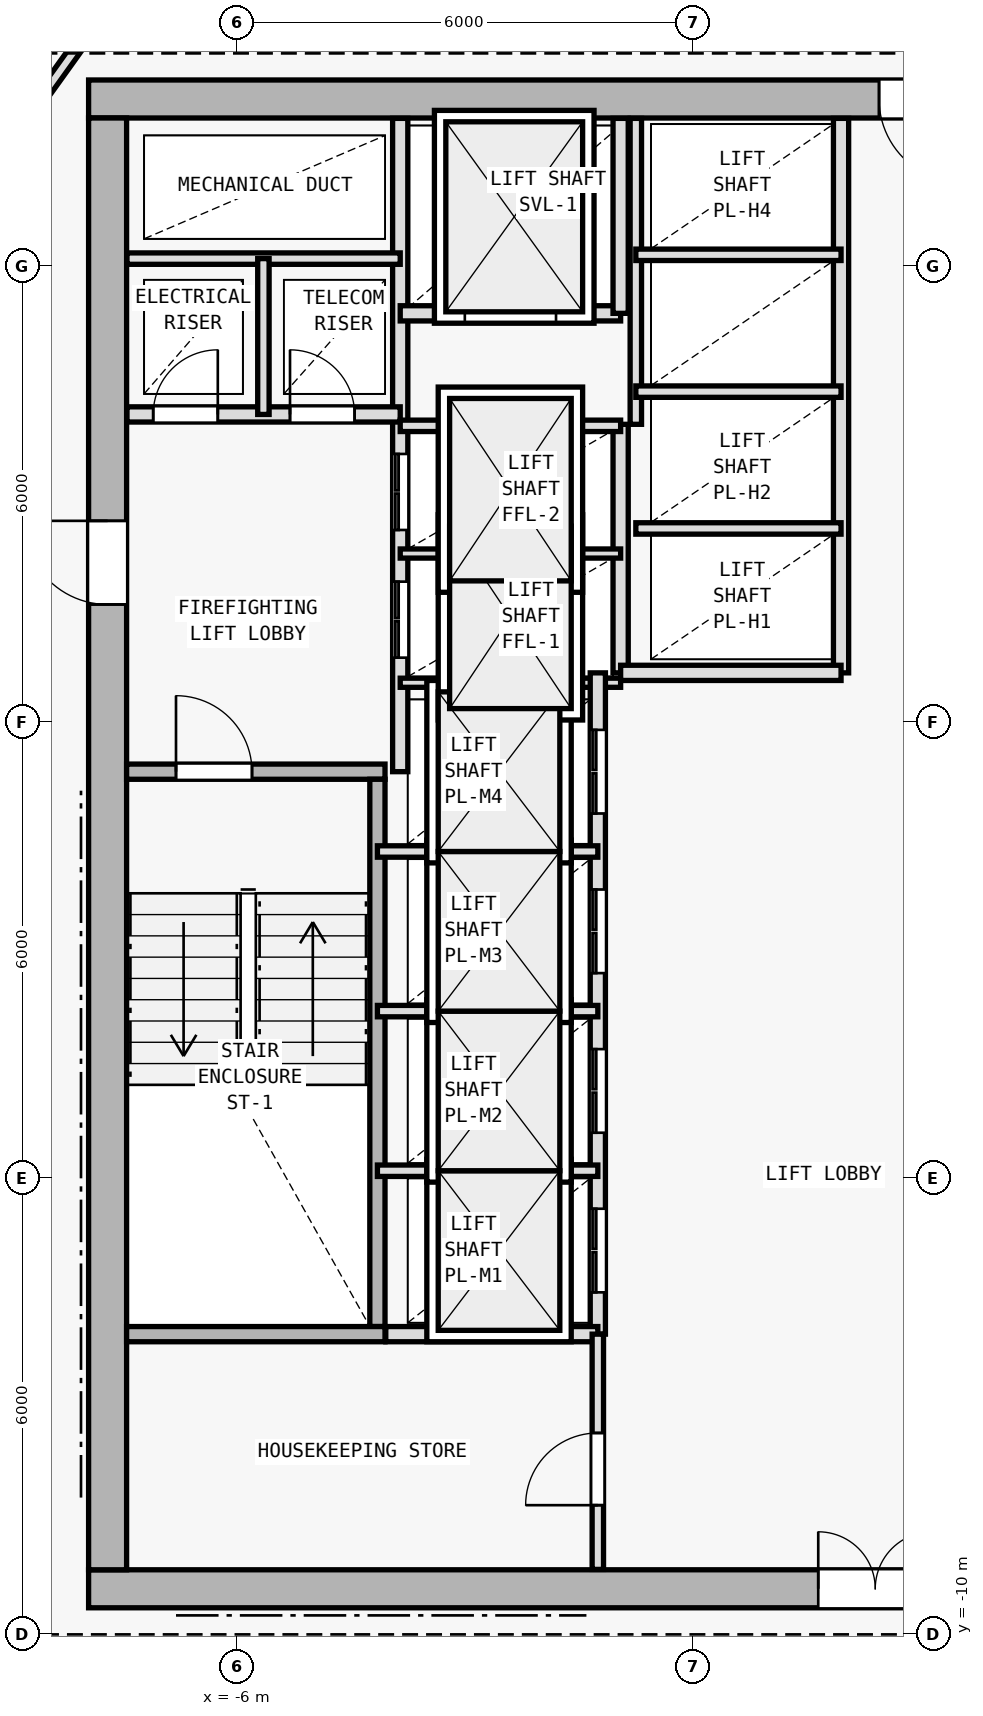
"""IFC4 building model, lengths in metres.
Left out: names, types, materials, properties, quantities, classifications, styles, units other than length and angle.
Written with IfcOpenShell. Run it as: python <this file> out.ifc"""

import sys

from ifc_helpers import new_model, si_unit, direction, frame, frame_2d, origin, origin_2d, place, context, subcontext, project, spatial, rectangle, i_section, extrude, element, fill, save


model = new_model("IFC4")
c1 = context("Model", 3, precision=1e-05, world=origin(), true_north=direction((0.0, 1.0)))
c2 = subcontext(c1, "Body", "Model", "MODEL_VIEW")
j1 = project(units=[si_unit("LENGTHUNIT", "METRE"), si_unit("PLANEANGLEUNIT", "RADIAN")], contexts=[c1])
p1 = place(None, origin())
s1 = spatial("IfcSite", under=j1, at=p1, CompositionType="ELEMENT")
p2 = place(p1, origin())
s2 = spatial("IfcBuilding", under=s1, at=p2, CompositionType="ELEMENT")
p3 = place(p2, frame((0.0, 0.0, 138.6)))
s3 = spatial("IfcBuildingStorey", under=s2, at=p3, CompositionType="ELEMENT", Elevation=138.6)
for number, where, z_axis, x_axis in (
    (1, (-7.7, -9.4, 0.0), (0.0, 0.0, 1.0), (1.0, 0.0, 0.0)),
    (2, (-7.7, 10.2, 0.0), (0.0, 0.0, 1.0), (1.0, 0.0, 0.0)),
    (3, (0.0, -9.4, 0.0), (0.0, 0.0, 1.0), (1.0, 0.0, 0.0)),
    (4, (-7.7, 2.0, 0.0), (0.0, 0.0, 1.0), (1.0, 0.0, 0.0)),
):
    element("IfcColumn", number, at=place(p3, frame(where, z_axis=z_axis, x_axis=x_axis)), inside=s3, PredefinedType="COLUMN", context=c2, shape_type="SweptSolid", body=[
        extrude(i_section(OverallWidth=0.404, OverallDepth=0.407, WebThickness=0.017, FlangeThickness=0.028, FilletRadius=0.015, at=origin_2d()), origin(), (0.0, 0.0, 1.0), 3.6),
    ])
p4 = place(p3, frame((-7.95, -9.4, 0.0), z_axis=(0.0, 0.0, 1.0), x_axis=(1.0, 0.0, 0.0)))
e5 = element("IfcWall", 5, at=p4, inside=s3, PredefinedType="SHEAR", context=c2, shape_type="SweptSolid", body=[
    extrude(rectangle(XDim=15.9, YDim=0.5, at=frame_2d((7.95, 0.0))), origin(), (0.0, 0.0, 1.0), 3.35),
])
p5 = place(p4, frame((9.6, 0.0, 0.0)))
e6 = element("IfcOpeningElement", 6, at=p5, cuts=e5, PredefinedType="OPENING", context=c2, shape_type="SweptSolid", body=[
    extrude(rectangle(XDim=1.5, YDim=2.2, at=frame_2d((0.75, 1.1))), frame((0.0, 0.26, 0.0), z_axis=(0.0, -1.0, 0.0), x_axis=(1.0, 0.0, 0.0)), (0.0, 0.0, 1.0), 0.52),
])
p6 = place(p3, frame((7.95, 10.2, 0.0), z_axis=(0.0, 0.0, 1.0), x_axis=(-1.0, 0.0, 0.0)))
e7 = element("IfcWall", 7, at=p6, inside=s3, PredefinedType="SHEAR", context=c2, shape_type="SweptSolid", body=[
    extrude(rectangle(XDim=15.9, YDim=0.5, at=frame_2d((7.95, 0.0))), origin(), (0.0, 0.0, 1.0), 3.35),
])
p7 = place(p6, frame((4.4, 0.0, 0.0)))
e8 = element("IfcOpeningElement", 8, at=p7, cuts=e7, PredefinedType="OPENING", context=c2, shape_type="SweptSolid", body=[
    extrude(rectangle(XDim=1.1, YDim=2.15, at=frame_2d((0.55, 1.075))), frame((0.0, 0.26, 0.0), z_axis=(0.0, -1.0, 0.0), x_axis=(1.0, 0.0, 0.0)), (0.0, 0.0, 1.0), 0.52),
])
p8 = place(p3, frame((-7.7, -9.15, 0.0), z_axis=(0.0, 0.0, 1.0), x_axis=(0.0, 1.0, 0.0)))
e9 = element("IfcWall", 9, at=p8, inside=s3, PredefinedType="SHEAR", context=c2, shape_type="SweptSolid", body=[
    extrude(rectangle(XDim=19.1, YDim=0.5, at=frame_2d((9.55, 0.0))), origin(), (0.0, 0.0, 1.0), 3.35),
])
p9 = place(p8, frame((12.7, 0.0, 0.0)))
e10 = element("IfcOpeningElement", 10, at=p9, cuts=e9, PredefinedType="OPENING", context=c2, shape_type="SweptSolid", body=[
    extrude(rectangle(XDim=1.1, YDim=2.15, at=frame_2d((0.55, 1.075))), frame((0.0, 0.26, 0.0), z_axis=(0.0, -1.0, 0.0), x_axis=(1.0, 0.0, 0.0)), (0.0, 0.0, 1.0), 0.52),
])
p10 = place(p3, frame((-7.45, 1.35, 0.0), z_axis=(0.0, 0.0, 1.0), x_axis=(1.0, 0.0, 0.0)))
e11 = element("IfcWall", 11, at=p10, inside=s3, PredefinedType="SOLIDWALL", context=c2, shape_type="SweptSolid", body=[
    extrude(rectangle(XDim=3.4, YDim=0.2, at=frame_2d((1.7, 0.0))), origin(), (0.0, 0.0, 1.0), 3.35),
])
p11 = place(p10, frame((0.65, 0.0, 0.0)))
e12 = element("IfcOpeningElement", 12, at=p11, cuts=e11, PredefinedType="OPENING", context=c2, shape_type="SweptSolid", body=[
    extrude(rectangle(XDim=1.0, YDim=2.15, at=frame_2d((0.5, 1.075))), frame((0.0, 0.11, 0.0), z_axis=(0.0, -1.0, 0.0), x_axis=(1.0, 0.0, 0.0)), (0.0, 0.0, 1.0), 0.22),
])
p12 = place(p3, frame((-4.15, -5.95, 0.0), z_axis=(0.0, 0.0, 1.0), x_axis=(0.0, 1.0, 0.0)))
e13 = element("IfcWall", 13, at=p12, inside=s3, PredefinedType="SOLIDWALL", context=c2, shape_type="SweptSolid", body=[
    extrude(rectangle(XDim=7.2, YDim=0.2, at=frame_2d((3.6, 0.0))), origin(), (0.0, 0.0, 1.0), 3.35),
])
p13 = place(p3, frame((-3.85, 1.35, 0.0), z_axis=(0.0, 0.0, 1.0), x_axis=(0.0, 1.0, 0.0)))
e14 = element("IfcWall", 14, at=p13, inside=s3, PredefinedType="SOLIDWALL", context=c2, shape_type="SweptSolid", body=[
    extrude(rectangle(XDim=8.595, YDim=0.2, at=frame_2d((4.297, 0.0))), origin(), (0.0, 0.0, 1.0), 3.35),
])
p14 = place(p13, frame((1.5, 0.0, 0.0)))
e15 = element("IfcOpeningElement", 15, at=p14, cuts=e14, PredefinedType="OPENING", context=c2, shape_type="SweptSolid", body=[
    extrude(rectangle(XDim=1.0, YDim=2.15, at=frame_2d((0.5, 1.075))), frame((0.0, 0.11, 0.0), z_axis=(0.0, -1.0, 0.0), x_axis=(1.0, 0.0, 0.0)), (0.0, 0.0, 1.0), 0.22),
])
p15 = place(p13, frame((3.18, 0.0, 0.0)))
e16 = element("IfcOpeningElement", 16, at=p15, cuts=e14, PredefinedType="OPENING", context=c2, shape_type="SweptSolid", body=[
    extrude(rectangle(XDim=1.0, YDim=2.15, at=frame_2d((0.5, 1.075))), frame((0.0, 0.11, 0.0), z_axis=(0.0, -1.0, 0.0), x_axis=(1.0, 0.0, 0.0)), (0.0, 0.0, 1.0), 0.22),
])
p16 = place(p3, frame((-7.445, 6.05, 0.0), z_axis=(0.0, 0.0, 1.0), x_axis=(1.0, 0.0, 0.0)))
e17 = element("IfcWall", 17, at=p16, inside=s3, PredefinedType="SOLIDWALL", context=c2, shape_type="SweptSolid", body=[
    extrude(rectangle(XDim=3.595, YDim=0.2, at=frame_2d((1.797, 0.0))), origin(), (0.0, 0.0, 1.0), 3.35),
])
p17 = place(p16, frame((0.345, 0.0, 0.0)))
e18 = element("IfcOpeningElement", 18, at=p17, cuts=e17, PredefinedType="OPENING", context=c2, shape_type="SweptSolid", body=[
    extrude(rectangle(XDim=0.85, YDim=2.1, at=frame_2d((0.425, 1.05))), frame((0.0, 0.11, 0.0), z_axis=(0.0, -1.0, 0.0), x_axis=(1.0, 0.0, 0.0)), (0.0, 0.0, 1.0), 0.22),
])
p18 = place(p16, frame((2.145, 0.0, 0.0)))
e19 = element("IfcOpeningElement", 19, at=p18, cuts=e17, PredefinedType="OPENING", context=c2, shape_type="SweptSolid", body=[
    extrude(rectangle(XDim=0.85, YDim=2.1, at=frame_2d((0.425, 1.05))), frame((0.0, 0.11, 0.0), z_axis=(0.0, -1.0, 0.0), x_axis=(1.0, 0.0, 0.0)), (0.0, 0.0, 1.0), 0.22),
])
p19 = place(p3, frame((-7.445, 8.1, 0.0), z_axis=(0.0, 0.0, 1.0), x_axis=(1.0, 0.0, 0.0)))
e20 = element("IfcWall", 20, at=p19, inside=s3, PredefinedType="PARTITIONING", context=c2, shape_type="SweptSolid", body=[
    extrude(rectangle(XDim=3.595, YDim=0.15, at=frame_2d((1.797, 0.0))), origin(), (0.0, 0.0, 1.0), 3.35),
])
p20 = place(p3, frame((-5.65, 6.05, 0.0), z_axis=(0.0, 0.0, 1.0), x_axis=(0.0, 1.0, 0.0)))
e21 = element("IfcWall", 21, at=p20, inside=s3, PredefinedType="PARTITIONING", context=c2, shape_type="SweptSolid", body=[
    extrude(rectangle(XDim=2.05, YDim=0.15, at=frame_2d((1.025, 0.0))), origin(), (0.0, 0.0, 1.0), 3.35),
])
p21 = place(p3, frame((-0.95, 2.65, 0.0), z_axis=(0.0, 0.0, 1.0), x_axis=(0.0, 1.0, 0.0)))
e22 = element("IfcWall", 22, at=p21, inside=s3, PredefinedType="SOLIDWALL", context=c2, shape_type="SweptSolid", body=[
    extrude(rectangle(XDim=3.27, YDim=0.2, at=frame_2d((1.635, 0.0))), origin(), (0.0, 0.0, 1.0), 3.35),
])
for number, where, z_axis, x_axis in (
    (23, (-3.85, 2.52, 0.0), (0.0, 0.0, 1.0), (1.0, 0.0, 0.0)),
    (24, (-3.85, 4.22, 0.0), (0.0, 0.0, 1.0), (1.0, 0.0, 0.0)),
):
    element("IfcWall", number, at=place(p3, frame(where, z_axis=z_axis, x_axis=x_axis)), inside=s3, PredefinedType="PARTITIONING", context=c2, shape_type="SweptSolid", body=[
        extrude(rectangle(XDim=2.9, YDim=0.12, at=frame_2d((1.45, 0.0))), origin(), (0.0, 0.0, 1.0), 3.35),
    ])
p22 = place(p3, frame((-3.85, 5.9, 0.0), z_axis=(0.0, 0.0, 1.0), x_axis=(1.0, 0.0, 0.0)))
e25 = element("IfcWall", 25, at=p22, inside=s3, PredefinedType="PARTITIONING", context=c2, shape_type="SweptSolid", body=[
    extrude(rectangle(XDim=2.9, YDim=0.15, at=frame_2d((1.45, 0.0))), origin(), (0.0, 0.0, 1.0), 3.35),
])
p23 = place(p3, frame((-3.85, 7.38, 0.0), z_axis=(0.0, 0.0, 1.0), x_axis=(1.0, 0.0, 0.0)))
e26 = element("IfcWall", 26, at=p23, inside=s3, PredefinedType="SOLIDWALL", context=c2, shape_type="SweptSolid", body=[
    extrude(rectangle(XDim=2.9, YDim=0.2, at=frame_2d((1.45, 0.0))), origin(), (0.0, 0.0, 1.0), 3.35),
])
p24 = place(p23, frame((0.85, 0.0, 0.0)))
e27 = element("IfcOpeningElement", 27, at=p24, cuts=e26, PredefinedType="OPENING", context=c2, shape_type="SweptSolid", body=[
    extrude(rectangle(XDim=1.2, YDim=2.2, at=frame_2d((0.6, 1.1))), frame((0.0, 0.11, 0.0), z_axis=(0.0, -1.0, 0.0), x_axis=(1.0, 0.0, 0.0)), (0.0, 0.0, 1.0), 0.22),
])
p25 = place(p3, frame((-0.95, 7.38, 0.0), z_axis=(0.0, 0.0, 1.0), x_axis=(0.0, 1.0, 0.0)))
e28 = element("IfcWall", 28, at=p25, inside=s3, PredefinedType="SOLIDWALL", context=c2, shape_type="SweptSolid", body=[
    extrude(rectangle(XDim=2.565, YDim=0.2, at=frame_2d((1.283, 0.0))), origin(), (0.0, 0.0, 1.0), 3.35),
])
p26 = place(p3, frame((-1.25, -6.05, 0.0), z_axis=(0.0, 0.0, 1.0), x_axis=(0.0, 1.0, 0.0)))
e29 = element("IfcWall", 29, at=p26, inside=s3, PredefinedType="SOLIDWALL", context=c2, shape_type="SweptSolid", body=[
    extrude(rectangle(XDim=8.7, YDim=0.2, at=frame_2d((4.35, 0.0))), origin(), (0.0, 0.0, 1.0), 3.35),
])
p27 = place(p26, frame((0.55, 0.0, 0.0)))
e30 = element("IfcOpeningElement", 30, at=p27, cuts=e29, PredefinedType="OPENING", context=c2, shape_type="SweptSolid", body=[
    extrude(rectangle(XDim=1.1, YDim=2.15, at=frame_2d((0.55, 1.075))), frame((0.0, 0.11, 0.0), z_axis=(0.0, -1.0, 0.0), x_axis=(1.0, 0.0, 0.0)), (0.0, 0.0, 1.0), 0.22),
])
p28 = place(p26, frame((2.65, 0.0, 0.0)))
e31 = element("IfcOpeningElement", 31, at=p28, cuts=e29, PredefinedType="OPENING", context=c2, shape_type="SweptSolid", body=[
    extrude(rectangle(XDim=1.1, YDim=2.15, at=frame_2d((0.55, 1.075))), frame((0.0, 0.11, 0.0), z_axis=(0.0, -1.0, 0.0), x_axis=(1.0, 0.0, 0.0)), (0.0, 0.0, 1.0), 0.22),
])
p29 = place(p26, frame((4.75, 0.0, 0.0)))
e32 = element("IfcOpeningElement", 32, at=p29, cuts=e29, PredefinedType="OPENING", context=c2, shape_type="SweptSolid", body=[
    extrude(rectangle(XDim=1.1, YDim=2.15, at=frame_2d((0.55, 1.075))), frame((0.0, 0.11, 0.0), z_axis=(0.0, -1.0, 0.0), x_axis=(1.0, 0.0, 0.0)), (0.0, 0.0, 1.0), 0.22),
])
p30 = place(p26, frame((6.85, 0.0, 0.0)))
e33 = element("IfcOpeningElement", 33, at=p30, cuts=e29, PredefinedType="OPENING", context=c2, shape_type="SweptSolid", body=[
    extrude(rectangle(XDim=1.1, YDim=2.15, at=frame_2d((0.55, 1.075))), frame((0.0, 0.11, 0.0), z_axis=(0.0, -1.0, 0.0), x_axis=(1.0, 0.0, 0.0)), (0.0, 0.0, 1.0), 0.22),
])
for number, where, z_axis, x_axis in (
    (34, (-4.15, -3.9, 0.0), (0.0, 0.0, 1.0), (1.0, 0.0, 0.0)),
    (35, (-4.15, -1.8, 0.0), (0.0, 0.0, 1.0), (1.0, 0.0, 0.0)),
    (36, (-4.15, 0.3, 0.0), (0.0, 0.0, 1.0), (1.0, 0.0, 0.0)),
):
    element("IfcWall", number, at=place(p3, frame(where, z_axis=z_axis, x_axis=x_axis)), inside=s3, PredefinedType="PARTITIONING", context=c2, shape_type="SweptSolid", body=[
        extrude(rectangle(XDim=2.9, YDim=0.15, at=frame_2d((1.45, 0.0))), origin(), (0.0, 0.0, 1.0), 3.35),
    ])
p31 = place(p3, frame((1.95, 2.65, 0.0), z_axis=(0.0, 0.0, 1.0), x_axis=(0.0, 1.0, 0.0)))
e37 = element("IfcWall", 37, at=p31, inside=s3, PredefinedType="SOLIDWALL", context=c2, shape_type="SweptSolid", body=[
    extrude(rectangle(XDim=7.295, YDim=0.2, at=frame_2d((3.647, 0.0))), origin(), (0.0, 0.0, 1.0), 3.35),
])
p32 = place(p3, frame((-0.95, 2.65, 0.0), z_axis=(0.0, 0.0, 1.0), x_axis=(1.0, 0.0, 0.0)))
e38 = element("IfcWall", 38, at=p32, inside=s3, PredefinedType="SOLIDWALL", context=c2, shape_type="SweptSolid", body=[
    extrude(rectangle(XDim=2.9, YDim=0.2, at=frame_2d((1.45, 0.0))), origin(), (0.0, 0.0, 1.0), 3.35),
])
p33 = place(p3, frame((-0.75, 5.92, 0.0), z_axis=(0.0, 0.0, 1.0), x_axis=(0.0, 1.0, 0.0)))
e39 = element("IfcWall", 39, at=p33, inside=s3, PredefinedType="PARTITIONING", context=c2, shape_type="SweptSolid", body=[
    extrude(rectangle(XDim=4.025, YDim=0.15, at=frame_2d((2.013, 0.0))), origin(), (0.0, 0.0, 1.0), 3.35),
])
for number, where, z_axis, x_axis in (
    (40, (-0.75, 4.55, 0.0), (0.0, 0.0, 1.0), (1.0, 0.0, 0.0)),
    (41, (-0.75, 6.35, 0.0), (0.0, 0.0, 1.0), (1.0, 0.0, 0.0)),
    (42, (-0.75, 8.15, 0.0), (0.0, 0.0, 1.0), (1.0, 0.0, 0.0)),
):
    element("IfcWall", number, at=place(p3, frame(where, z_axis=z_axis, x_axis=x_axis)), inside=s3, PredefinedType="PARTITIONING", context=c2, shape_type="SweptSolid", body=[
        extrude(rectangle(XDim=2.7, YDim=0.15, at=frame_2d((1.35, 0.0))), origin(), (0.0, 0.0, 1.0), 3.35),
    ])
p34 = place(p3, frame((-7.45, -6.05, 0.0), z_axis=(0.0, 0.0, 1.0), x_axis=(1.0, 0.0, 0.0)))
e43 = element("IfcWall", 43, at=p34, inside=s3, PredefinedType="SOLIDWALL", context=c2, shape_type="SweptSolid", body=[
    extrude(rectangle(XDim=3.4, YDim=0.2, at=frame_2d((1.7, 0.0))), origin(), (0.0, 0.0, 1.0), 3.35),
])
p35 = place(p3, frame((-4.04, -6.05, 0.0), z_axis=(0.0, 0.0, 1.0), x_axis=(1.0, 0.0, 0.0)))
e44 = element("IfcWall", 44, at=p35, inside=s3, PredefinedType="SOLIDWALL", context=c2, shape_type="SweptSolid", body=[
    extrude(rectangle(XDim=2.79, YDim=0.2, at=frame_2d((1.395, 0.0))), origin(), (0.0, 0.0, 1.0), 3.35),
])
p36 = place(p3, frame((-1.25, -9.145, 0.0), z_axis=(0.0, 0.0, 1.0), x_axis=(0.0, 1.0, 0.0)))
e45 = element("IfcWall", 45, at=p36, inside=s3, PredefinedType="PARTITIONING", context=c2, shape_type="SweptSolid", body=[
    extrude(rectangle(XDim=3.095, YDim=0.15, at=frame_2d((1.547, 0.0))), origin(), (0.0, 0.0, 1.0), 3.35),
])
p37 = place(p36, frame((0.845, 0.0, 0.0)))
e46 = element("IfcOpeningElement", 46, at=p37, cuts=e45, PredefinedType="OPENING", context=c2, shape_type="SweptSolid", body=[
    extrude(rectangle(XDim=0.95, YDim=2.1, at=frame_2d((0.475, 1.05))), frame((0.0, 0.085, 0.0), z_axis=(0.0, -1.0, 0.0), x_axis=(1.0, 0.0, 0.0)), (0.0, 0.0, 1.0), 0.17),
])
p38 = place(p3, frame((-9.86, 8.426, 0.0), z_axis=(0.0, 0.0, 1.0), x_axis=(0.582449511476, 0.812866881218, 0.0)))
e47 = element("IfcWall", 47, at=p38, inside=s3, PredefinedType="PARTITIONING", context=c2, shape_type="SweptSolid", body=[
    extrude(rectangle(XDim=4.84, YDim=0.15, at=frame_2d((2.42, 0.0))), origin(), (0.0, 0.0, 1.0), 2.965),
])
p39 = place(p5, origin())
e48 = element("IfcDoor", 48, at=p39, inside=s3, OperationType="DOUBLE_DOOR_SINGLE_SWING", PredefinedType="DOOR", context=c2, shape_type="SweptSolid", body=[
    extrude(rectangle(XDim=1.5, YDim=2.2, at=frame_2d((0.75, 1.1))), frame((0.0, 0.025, 0.0), z_axis=(0.0, -1.0, 0.0), x_axis=(1.0, 0.0, 0.0)), (0.0, 0.0, 1.0), 0.05),
])
fill(e6, e48)
p40 = place(p9, origin())
e49 = element("IfcDoor", 49, at=p40, inside=s3, OperationType="SINGLE_SWING_RIGHT", PredefinedType="DOOR", context=c2, shape_type="SweptSolid", body=[
    extrude(rectangle(XDim=1.1, YDim=2.15, at=frame_2d((0.55, 1.075))), frame((0.0, 0.025, 0.0), z_axis=(0.0, -1.0, 0.0), x_axis=(1.0, 0.0, 0.0)), (0.0, 0.0, 1.0), 0.05),
])
fill(e10, e49)
p41 = place(p7, origin())
e50 = element("IfcDoor", 50, at=p41, inside=s3, OperationType="SINGLE_SWING_LEFT", PredefinedType="DOOR", context=c2, shape_type="SweptSolid", body=[
    extrude(rectangle(XDim=1.1, YDim=2.15, at=frame_2d((0.55, 1.075))), frame((0.0, 0.025, 0.0), z_axis=(0.0, -1.0, 0.0), x_axis=(1.0, 0.0, 0.0)), (0.0, 0.0, 1.0), 0.05),
])
fill(e8, e50)
p42 = place(p11, origin())
e51 = element("IfcDoor", 51, at=p42, inside=s3, OperationType="SINGLE_SWING_LEFT", PredefinedType="DOOR", context=c2, shape_type="SweptSolid", body=[
    extrude(rectangle(XDim=1.0, YDim=2.15, at=frame_2d((0.5, 1.075))), frame((0.0, 0.025, 0.0), z_axis=(0.0, -1.0, 0.0), x_axis=(1.0, 0.0, 0.0)), (0.0, 0.0, 1.0), 0.05),
])
fill(e12, e51)
p43 = place(p17, origin())
e52 = element("IfcDoor", 52, at=p43, inside=s3, OperationType="SINGLE_SWING_RIGHT", PredefinedType="DOOR", context=c2, shape_type="SweptSolid", body=[
    extrude(rectangle(XDim=0.85, YDim=2.1, at=frame_2d((0.425, 1.05))), frame((0.0, 0.025, 0.0), z_axis=(0.0, -1.0, 0.0), x_axis=(1.0, 0.0, 0.0)), (0.0, 0.0, 1.0), 0.05),
])
fill(e18, e52)
p44 = place(p18, origin())
e53 = element("IfcDoor", 53, at=p44, inside=s3, OperationType="SINGLE_SWING_LEFT", PredefinedType="DOOR", context=c2, shape_type="SweptSolid", body=[
    extrude(rectangle(XDim=0.85, YDim=2.1, at=frame_2d((0.425, 1.05))), frame((0.0, 0.025, 0.0), z_axis=(0.0, -1.0, 0.0), x_axis=(1.0, 0.0, 0.0)), (0.0, 0.0, 1.0), 0.05),
])
fill(e19, e53)
p45 = place(p24, origin())
e54 = element("IfcDoor", 54, at=p45, inside=s3, OperationType="DOUBLE_DOOR_SLIDING", PredefinedType="DOOR", context=c2, shape_type="SweptSolid", body=[
    extrude(rectangle(XDim=1.2, YDim=2.2, at=frame_2d((0.6, 1.1))), frame((0.0, 0.025, 0.0), z_axis=(0.0, -1.0, 0.0), x_axis=(1.0, 0.0, 0.0)), (0.0, 0.0, 1.0), 0.05),
])
fill(e27, e54)
p46 = place(p27, origin())
e55 = element("IfcDoor", 55, at=p46, inside=s3, OperationType="DOUBLE_DOOR_SLIDING", PredefinedType="DOOR", context=c2, shape_type="SweptSolid", body=[
    extrude(rectangle(XDim=1.1, YDim=2.15, at=frame_2d((0.55, 1.075))), frame((0.0, 0.025, 0.0), z_axis=(0.0, -1.0, 0.0), x_axis=(1.0, 0.0, 0.0)), (0.0, 0.0, 1.0), 0.05),
])
fill(e30, e55)
p47 = place(p28, origin())
e56 = element("IfcDoor", 56, at=p47, inside=s3, OperationType="DOUBLE_DOOR_SLIDING", PredefinedType="DOOR", context=c2, shape_type="SweptSolid", body=[
    extrude(rectangle(XDim=1.1, YDim=2.15, at=frame_2d((0.55, 1.075))), frame((0.0, 0.025, 0.0), z_axis=(0.0, -1.0, 0.0), x_axis=(1.0, 0.0, 0.0)), (0.0, 0.0, 1.0), 0.05),
])
fill(e31, e56)
p48 = place(p29, origin())
e57 = element("IfcDoor", 57, at=p48, inside=s3, OperationType="DOUBLE_DOOR_SLIDING", PredefinedType="DOOR", context=c2, shape_type="SweptSolid", body=[
    extrude(rectangle(XDim=1.1, YDim=2.15, at=frame_2d((0.55, 1.075))), frame((0.0, 0.025, 0.0), z_axis=(0.0, -1.0, 0.0), x_axis=(1.0, 0.0, 0.0)), (0.0, 0.0, 1.0), 0.05),
])
fill(e32, e57)
p49 = place(p30, origin())
e58 = element("IfcDoor", 58, at=p49, inside=s3, OperationType="DOUBLE_DOOR_SLIDING", PredefinedType="DOOR", context=c2, shape_type="SweptSolid", body=[
    extrude(rectangle(XDim=1.1, YDim=2.15, at=frame_2d((0.55, 1.075))), frame((0.0, 0.025, 0.0), z_axis=(0.0, -1.0, 0.0), x_axis=(1.0, 0.0, 0.0)), (0.0, 0.0, 1.0), 0.05),
])
fill(e33, e58)
p50 = place(p14, origin())
e59 = element("IfcDoor", 59, at=p50, inside=s3, OperationType="DOUBLE_DOOR_SLIDING", PredefinedType="DOOR", context=c2, shape_type="SweptSolid", body=[
    extrude(rectangle(XDim=1.0, YDim=2.15, at=frame_2d((0.5, 1.075))), frame((0.0, 0.025, 0.0), z_axis=(0.0, -1.0, 0.0), x_axis=(1.0, 0.0, 0.0)), (0.0, 0.0, 1.0), 0.05),
])
fill(e15, e59)
p51 = place(p15, origin())
e60 = element("IfcDoor", 60, at=p51, inside=s3, OperationType="DOUBLE_DOOR_SLIDING", PredefinedType="DOOR", context=c2, shape_type="SweptSolid", body=[
    extrude(rectangle(XDim=1.0, YDim=2.15, at=frame_2d((0.5, 1.075))), frame((0.0, 0.025, 0.0), z_axis=(0.0, -1.0, 0.0), x_axis=(1.0, 0.0, 0.0)), (0.0, 0.0, 1.0), 0.05),
])
fill(e16, e60)
p52 = place(p37, origin())
e61 = element("IfcDoor", 61, at=p52, inside=s3, OperationType="SINGLE_SWING_LEFT", PredefinedType="DOOR", context=c2, shape_type="SweptSolid", body=[
    extrude(rectangle(XDim=0.95, YDim=2.1, at=frame_2d((0.475, 1.05))), frame((0.0, 0.025, 0.0), z_axis=(0.0, -1.0, 0.0), x_axis=(1.0, 0.0, 0.0)), (0.0, 0.0, 1.0), 0.05),
])
fill(e46, e61)
save(model, sys.argv[1])
